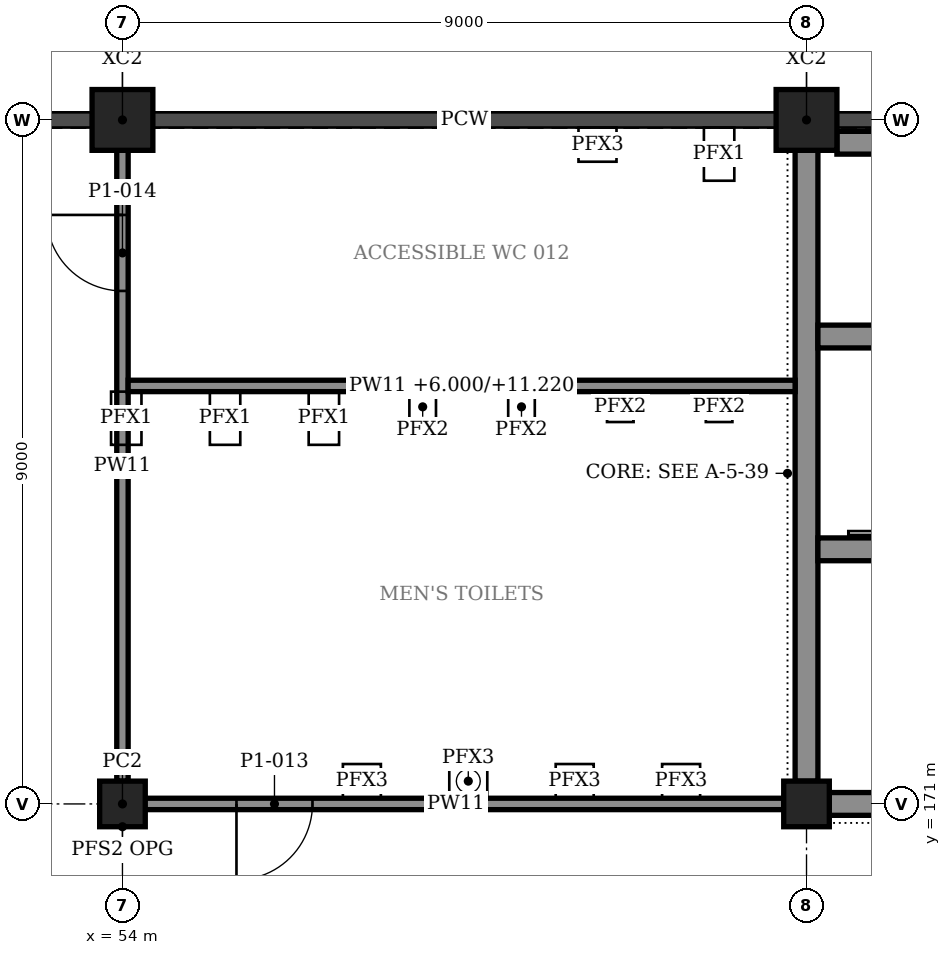
"""IFC4 building model, lengths in metres.
Left out: names, types, materials, properties, quantities, classifications, styles, units other than length and angle.
Written with IfcOpenShell. Run it as: python <this file> out.ifc"""

import sys

from ifc_helpers import new_model, si_unit, direction, frame, frame_2d, origin, origin_2d, place, context, subcontext, project, spatial, rectangle, extrude, element, fill, save


model = new_model("IFC4")
c1 = context("Model", 3, precision=1e-05, world=origin(), true_north=direction((0.0, 1.0)))
c2 = subcontext(c1, "Body", "Model", "MODEL_VIEW")
j1 = project(units=[si_unit("LENGTHUNIT", "METRE"), si_unit("PLANEANGLEUNIT", "RADIAN")], contexts=[c1])
p1 = place(None, origin())
s1 = spatial("IfcSite", under=j1, at=p1, CompositionType="ELEMENT")
p2 = place(p1, origin())
s2 = spatial("IfcBuilding", under=s1, at=p2, CompositionType="ELEMENT")
p3 = place(p2, frame((0.0, 0.0, 6.0)))
s3 = spatial("IfcBuildingStorey", under=s2, at=p3, CompositionType="ELEMENT", Elevation=6.0)
for number, where, z_axis, x_axis in (
    (1, (54.0, 171.0, 0.0), (0.0, 0.0, 1.0), (1.0, 0.0, 0.0)),
    (2, (63.0, 171.0, 0.0), (0.0, 0.0, 1.0), (1.0, 0.0, 0.0)),
):
    element("IfcColumn", number, at=place(p3, frame(where, z_axis=z_axis, x_axis=x_axis)), inside=s3, PredefinedType="COLUMN", context=c2, shape_type="SweptSolid", body=[
        extrude(rectangle(XDim=0.6, YDim=0.6, at=origin_2d()), origin(), (0.0, 0.0, 1.0), 5.5),
    ])
for number, where, z_axis, x_axis in (
    (3, (54.0, 180.0, 0.0), (0.0, 0.0, 1.0), (1.0, 0.0, 0.0)),
    (4, (63.0, 180.0, 0.0), (0.0, 0.0, 1.0), (1.0, 0.0, 0.0)),
):
    element("IfcColumn", number, at=place(p3, frame(where, z_axis=z_axis, x_axis=x_axis)), inside=s3, PredefinedType="COLUMN", context=c2, shape_type="SweptSolid", body=[
        extrude(rectangle(XDim=0.8, YDim=0.8, at=origin_2d()), origin(), (0.0, 0.0, 1.0), 5.5),
    ])
p4 = place(p3, frame((63.0, 171.3, 0.0), z_axis=(0.0, 0.0, 1.0), x_axis=(0.0, 1.0, 0.0)))
e5 = element("IfcWall", 5, at=p4, inside=s3, PredefinedType="SOLIDWALL", context=c2, shape_type="SweptSolid", body=[
    extrude(rectangle(XDim=8.3, YDim=0.3, at=frame_2d((4.15, 0.0))), origin(), (0.0, 0.0, 1.0), 4.32),
])
p5 = place(p3, frame((63.3, 171.0, 0.0), z_axis=(0.0, 0.0, 1.0), x_axis=(1.0, 0.0, 0.0)))
e6 = element("IfcWall", 6, at=p5, inside=s3, PredefinedType="SOLIDWALL", context=c2, shape_type="SweptSolid", body=[
    extrude(rectangle(XDim=8.3, YDim=0.3, at=frame_2d((4.15, 0.0))), origin(), (0.0, 0.0, 1.0), 4.32),
])
p6 = place(p5, frame((1.0, 0.0, 0.0)))
e7 = element("IfcOpeningElement", 7, at=p6, cuts=e6, PredefinedType="OPENING", context=c2, shape_type="SweptSolid", body=[
    extrude(rectangle(XDim=1.4, YDim=2.4, at=frame_2d((0.7, 1.2))), frame((0.0, 0.16, 0.0), z_axis=(0.0, -1.0, 0.0), x_axis=(1.0, 0.0, 0.0)), (0.0, 0.0, 1.0), 0.32),
])
p7 = place(p3, frame((63.4, 179.7, 0.0), z_axis=(0.0, 0.0, 1.0), x_axis=(1.0, 0.0, 0.0)))
e8 = element("IfcWall", 8, at=p7, inside=s3, PredefinedType="SOLIDWALL", context=c2, shape_type="SweptSolid", body=[
    extrude(rectangle(XDim=8.2, YDim=0.3, at=frame_2d((4.1, 0.0))), origin(), (0.0, 0.0, 1.0), 4.32),
])
p8 = place(p3, frame((54.0, 171.3, 0.0), z_axis=(0.0, 0.0, 1.0), x_axis=(0.0, 1.0, 0.0)))
e9 = element("IfcWall", 9, at=p8, inside=s3, PredefinedType="PARTITIONING", context=c2, shape_type="SweptSolid", body=[
    extrude(rectangle(XDim=8.3, YDim=0.15, at=frame_2d((4.15, 0.0))), origin(), (0.0, 0.0, 1.0), 4.32),
])
p9 = place(p8, frame((6.45, 0.0, 0.0)))
e10 = element("IfcOpeningElement", 10, at=p9, cuts=e9, PredefinedType="OPENING", context=c2, shape_type="SweptSolid", body=[
    extrude(rectangle(XDim=1.0, YDim=2.4, at=frame_2d((0.5, 1.2))), frame((0.0, 0.085, 0.0), z_axis=(0.0, -1.0, 0.0), x_axis=(1.0, 0.0, 0.0)), (0.0, 0.0, 1.0), 0.17),
])
p10 = place(p3, frame((62.7, 171.0, 0.0), z_axis=(0.0, 0.0, 1.0), x_axis=(-1.0, 0.0, 0.0)))
e11 = element("IfcWall", 11, at=p10, inside=s3, PredefinedType="PARTITIONING", context=c2, shape_type="SweptSolid", body=[
    extrude(rectangle(XDim=8.625, YDim=0.15, at=frame_2d((4.312, 0.0))), origin(), (0.0, 0.0, 1.0), 4.32),
])
p11 = place(p10, frame((6.2, 0.0, 0.0)))
e12 = element("IfcOpeningElement", 12, at=p11, cuts=e11, PredefinedType="OPENING", context=c2, shape_type="SweptSolid", body=[
    extrude(rectangle(XDim=1.0, YDim=2.4, at=frame_2d((0.5, 1.2))), frame((0.0, 0.085, 0.0), z_axis=(0.0, -1.0, 0.0), x_axis=(1.0, 0.0, 0.0)), (0.0, 0.0, 1.0), 0.17),
])
p12 = place(p3, frame((62.85, 176.5, 0.0), z_axis=(0.0, 0.0, 1.0), x_axis=(-1.0, 0.0, 0.0)))
e13 = element("IfcWall", 13, at=p12, inside=s3, PredefinedType="PARTITIONING", context=c2, shape_type="SweptSolid", body=[
    extrude(rectangle(XDim=8.775, YDim=0.15, at=frame_2d((4.388, 0.0))), origin(), (0.0, 0.0, 1.0), 5.22),
])
p13 = place(p3, frame((63.15, 174.35, 0.0), z_axis=(0.0, 0.0, 1.0), x_axis=(1.0, 0.0, 0.0)))
e14 = element("IfcWall", 14, at=p13, inside=s3, PredefinedType="SOLIDWALL", context=c2, shape_type="SweptSolid", body=[
    extrude(rectangle(XDim=2.6, YDim=0.3, at=frame_2d((1.3, 0.0))), origin(), (0.0, 0.0, 1.0), 5.22),
])
p14 = place(p13, frame((0.95, 0.0, 0.0)))
e15 = element("IfcOpeningElement", 15, at=p14, cuts=e14, PredefinedType="OPENING", context=c2, shape_type="SweptSolid", body=[
    extrude(rectangle(XDim=1.1, YDim=2.1, at=frame_2d((0.55, 1.05))), frame((0.0, 0.16, 0.0), z_axis=(0.0, -1.0, 0.0), x_axis=(1.0, 0.0, 0.0)), (0.0, 0.0, 1.0), 0.32),
])
p15 = place(p3, frame((63.15, 177.15, 0.0), z_axis=(0.0, 0.0, 1.0), x_axis=(1.0, 0.0, 0.0)))
e16 = element("IfcWall", 16, at=p15, inside=s3, PredefinedType="SOLIDWALL", context=c2, shape_type="SweptSolid", body=[
    extrude(rectangle(XDim=2.6, YDim=0.3, at=frame_2d((1.3, 0.0))), origin(), (0.0, 0.0, 1.0), 5.22),
])
p16 = place(p11, origin())
e17 = element("IfcDoor", 17, at=p16, inside=s3, OperationType="SINGLE_SWING_RIGHT", PredefinedType="DOOR", context=c2, shape_type="SweptSolid", body=[
    extrude(rectangle(XDim=1.0, YDim=2.4, at=frame_2d((0.5, 1.2))), frame((0.0, 0.025, 0.0), z_axis=(0.0, -1.0, 0.0), x_axis=(1.0, 0.0, 0.0)), (0.0, 0.0, 1.0), 0.05),
])
fill(e12, e17)
p17 = place(p9, origin())
e18 = element("IfcDoor", 18, at=p17, inside=s3, OperationType="SINGLE_SWING_RIGHT", PredefinedType="DOOR", context=c2, shape_type="SweptSolid", body=[
    extrude(rectangle(XDim=1.0, YDim=2.4, at=frame_2d((0.5, 1.2))), frame((0.0, 0.025, 0.0), z_axis=(0.0, -1.0, 0.0), x_axis=(1.0, 0.0, 0.0)), (0.0, 0.0, 1.0), 0.05),
])
fill(e10, e18)
save(model, sys.argv[1])
